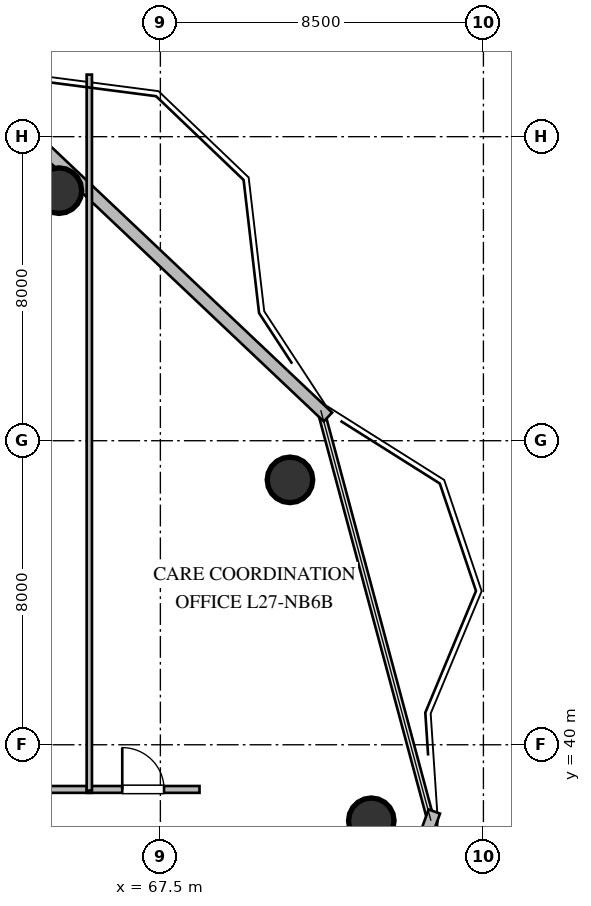
"""IFC4 building model, lengths in metres.
Left out: names, types, materials, properties, quantities, classifications, styles, units other than length and angle.
Written with IfcOpenShell. Run it as: python <this file> out.ifc"""

import sys

from ifc_helpers import new_model, si_unit, direction, frame, frame_2d, origin, origin_2d, place, context, subcontext, project, spatial, rectangle, circle, extrude, element, fill, save


model = new_model("IFC4")
c1 = context("Model", 3, precision=1e-05, world=origin(), true_north=direction((0.0, 1.0)))
c2 = subcontext(c1, "Body", "Model", "MODEL_VIEW")
j1 = project(units=[si_unit("LENGTHUNIT", "METRE"), si_unit("PLANEANGLEUNIT", "RADIAN")], contexts=[c1])
p1 = place(None, origin())
s1 = spatial("IfcSite", under=j1, at=p1, CompositionType="ELEMENT")
p2 = place(p1, origin())
s2 = spatial("IfcBuilding", under=s1, at=p2, CompositionType="ELEMENT")
p3 = place(p2, frame((0.0, 0.0, 106.2)))
s3 = spatial("IfcBuildingStorey", under=s2, at=p3, CompositionType="ELEMENT", Elevation=106.2)
for number, where, z_axis, x_axis in (
    (1, (73.05, 38.0, 0.0), (0.0, 0.0, 1.0), (1.0, 0.0, 0.0)),
    (2, (70.91, 46.97, 0.0), (0.0, 0.0, 1.0), (1.0, 0.0, 0.0)),
    (3, (64.83, 54.58, 0.0), (0.0, 0.0, 1.0), (1.0, 0.0, 0.0)),
):
    element("IfcColumn", number, at=place(p3, frame(where, z_axis=z_axis, x_axis=x_axis)), inside=s3, PredefinedType="COLUMN", context=c2, shape_type="SweptSolid", body=[
        extrude(circle(Radius=0.6, at=origin_2d()), origin(), (0.0, 0.0, 1.0), 3.6),
    ])
p4 = place(p3, frame((74.708, 38.244, 0.0), z_axis=(0.0, 0.0, 1.0), x_axis=(-0.340324669139, -0.94030799187, 0.0)))
e4 = element("IfcWall", 4, at=p4, inside=s3, PredefinedType="STANDARD", context=c2, shape_type="SweptSolid", body=[
    extrude(rectangle(XDim=13.81, YDim=0.32, at=frame_2d((6.905, 0.0))), origin(), (0.0, 0.0, 1.0), 3.36),
])
p5 = place(p3, frame((60.538, 59.383, 0.0), z_axis=(0.0, 0.0, 1.0), x_axis=(0.726378346584, -0.687295058628, 0.0)))
e5 = element("IfcWall", 5, at=p5, inside=s3, PredefinedType="STANDARD", context=c2, shape_type="SweptSolid", body=[
    extrude(rectangle(XDim=15.654, YDim=0.32, at=frame_2d((7.827, 0.0))), origin(), (0.0, 0.0, 1.0), 3.36),
])
p6 = place(p3, frame((55.435, 38.825, 0.0), z_axis=(0.0, 0.0, 1.0), x_axis=(1.0, 0.0, 0.0)))
e6 = element("IfcWall", 6, at=p6, inside=s3, PredefinedType="PARTITIONING", context=c2, shape_type="SweptSolid", body=[
    extrude(rectangle(XDim=10.26, YDim=0.18, at=frame_2d((5.13, 0.0))), origin(), (0.0, 0.0, 1.0), 3.36),
])
p7 = place(p6, frame((4.58, 0.0, 0.0)))
e7 = element("IfcOpeningElement", 7, at=p7, cuts=e6, PredefinedType="OPENING", context=c2, shape_type="SweptSolid", body=[
    extrude(rectangle(XDim=1.1, YDim=2.1, at=frame_2d((0.55, 1.05))), frame((0.0, 0.1, 0.0), z_axis=(0.0, -1.0, 0.0), x_axis=(1.0, 0.0, 0.0)), (0.0, 0.0, 1.0), 0.2),
])
p8 = place(p3, frame((65.565, 38.825, 0.0), z_axis=(0.0, 0.0, 1.0), x_axis=(1.0, 0.0, 0.0)))
e8 = element("IfcWall", 8, at=p8, inside=s3, PredefinedType="PARTITIONING", context=c2, shape_type="SweptSolid", body=[
    extrude(rectangle(XDim=2.965, YDim=0.18, at=frame_2d((1.482, 0.0))), origin(), (0.0, 0.0, 1.0), 3.36),
])
p9 = place(p8, frame((0.932, 0.0, 0.0)))
e9 = element("IfcOpeningElement", 9, at=p9, cuts=e8, PredefinedType="OPENING", context=c2, shape_type="SweptSolid", body=[
    extrude(rectangle(XDim=1.1, YDim=2.1, at=frame_2d((0.55, 1.05))), frame((0.0, 0.1, 0.0), z_axis=(0.0, -1.0, 0.0), x_axis=(1.0, 0.0, 0.0)), (0.0, 0.0, 1.0), 0.2),
])
p10 = place(p3, frame((65.63, 57.634, 0.0), z_axis=(0.0, 0.0, 1.0), x_axis=(0.0, -1.0, 0.0)))
e10 = element("IfcWall", 10, at=p10, inside=s3, PredefinedType="PARTITIONING", context=c2, shape_type="SweptSolid", body=[
    extrude(rectangle(XDim=18.839, YDim=0.14, at=frame_2d((9.419, 0.0))), origin(), (0.0, 0.0, 1.0), 3.36),
])
p11 = place(p9, origin())
e11 = element("IfcDoor", 11, at=p11, inside=s3, OperationType="SINGLE_SWING_LEFT", PredefinedType="DOOR", context=c2, shape_type="SweptSolid", body=[
    extrude(rectangle(XDim=1.1, YDim=2.1, at=frame_2d((0.55, 1.05))), frame((0.0, 0.025, 0.0), z_axis=(0.0, -1.0, 0.0), x_axis=(1.0, 0.0, 0.0)), (0.0, 0.0, 1.0), 0.05),
])
fill(e9, e11)
save(model, sys.argv[1])
